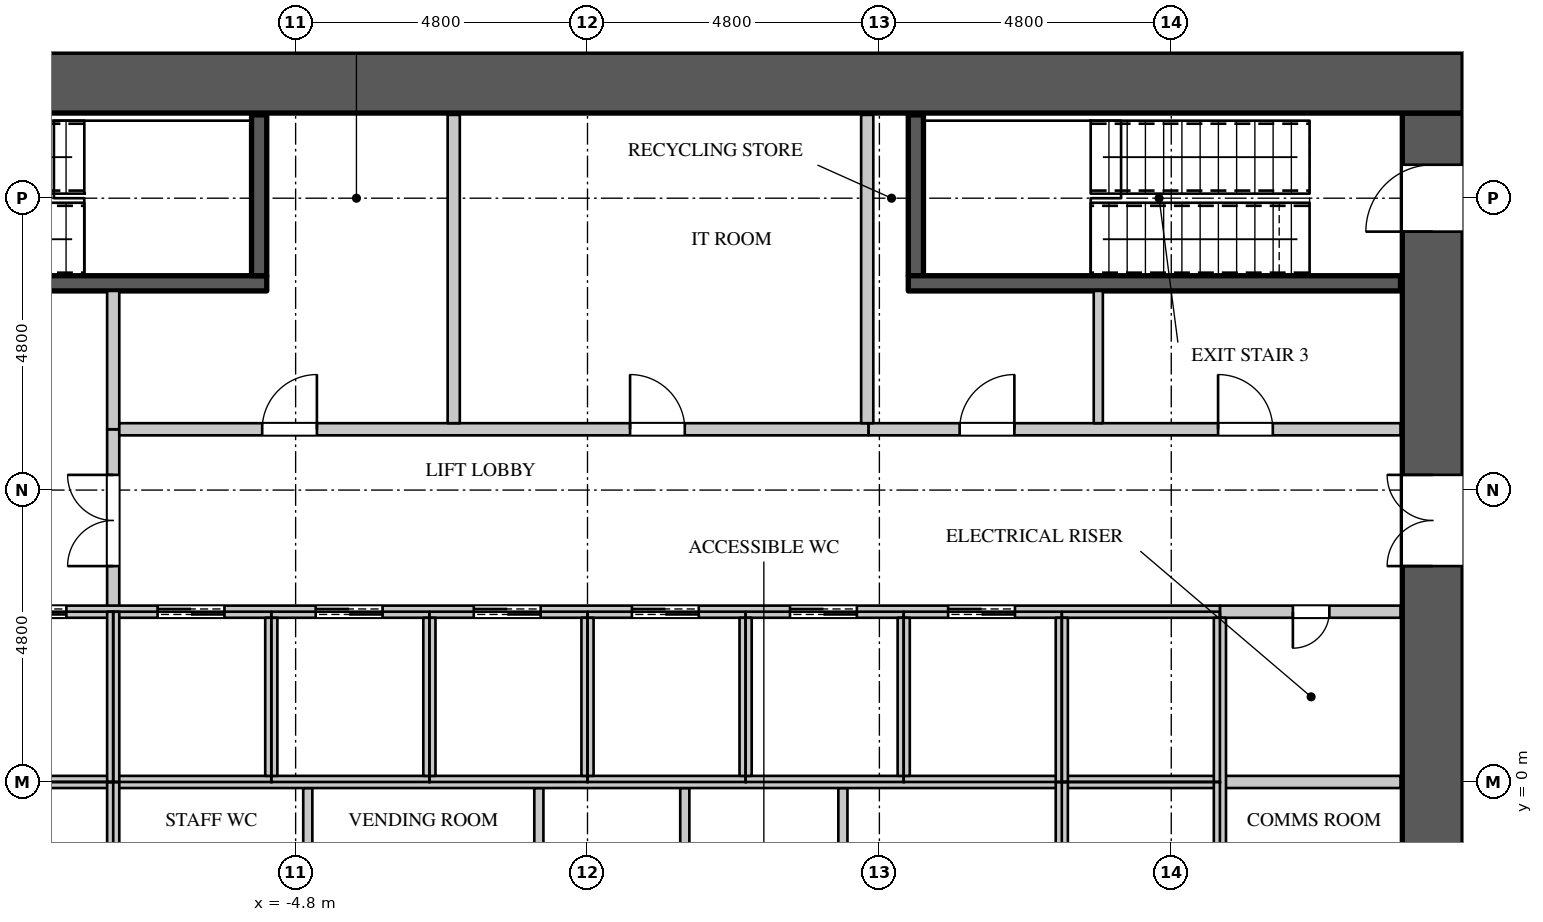
"""IFC4 building model, lengths in metres.
Left out: names, types, materials, properties, quantities, classifications, styles, units other than length and angle.
Written with IfcOpenShell. Run it as: python <this file> out.ifc"""

import sys

from ifc_helpers import new_model, si_unit, direction, frame, frame_2d, origin, place, context, subcontext, project, spatial, rectangle, extrude, element, fill, save


model = new_model("IFC4")
c1 = context("Model", 3, precision=1e-05, world=origin(), true_north=direction((0.0, 1.0)))
c2 = subcontext(c1, "Body", "Model", "MODEL_VIEW")
j1 = project(units=[si_unit("LENGTHUNIT", "METRE"), si_unit("PLANEANGLEUNIT", "RADIAN")], contexts=[c1])
p1 = place(None, origin())
s1 = spatial("IfcSite", under=j1, at=p1, CompositionType="ELEMENT")
p2 = place(p1, origin())
s2 = spatial("IfcBuilding", under=s1, at=p2, CompositionType="ELEMENT")
p3 = place(p2, frame((0.0, 0.0, 25.5)))
s3 = spatial("IfcBuildingStorey", under=s2, at=p3, CompositionType="ELEMENT", Elevation=25.5)
p4 = place(p3, frame((-14.4, 11.5, 0.0), z_axis=(0.0, 0.0, 1.0), x_axis=(1.0, 0.0, 0.0)))
e1 = element("IfcWall", 1, at=p4, inside=s3, PredefinedType="SHEAR", context=c2, shape_type="SweptSolid", body=[
    extrude(rectangle(XDim=28.8, YDim=1.0, at=frame_2d((14.4, 0.0))), origin(), (0.0, 0.0, 1.0), 4.2),
])
p5 = place(p3, frame((13.9, -11.0, 0.0), z_axis=(0.0, 0.0, 1.0), x_axis=(0.0, 1.0, 0.0)))
e2 = element("IfcWall", 2, at=p5, inside=s3, PredefinedType="SHEAR", context=c2, shape_type="SweptSolid", body=[
    extrude(rectangle(XDim=22.0, YDim=1.0, at=frame_2d((11.0, 0.0))), origin(), (0.0, 0.0, 1.0), 4.2),
])
p6 = place(p5, frame((20.05, 0.0, 0.0)))
e3 = element("IfcOpeningElement", 3, at=p6, cuts=e2, PredefinedType="OPENING", context=c2, shape_type="SweptSolid", body=[
    extrude(rectangle(XDim=1.1, YDim=2.2, at=frame_2d((0.55, 1.1))), frame((0.0, 0.51, 0.0), z_axis=(0.0, -1.0, 0.0), x_axis=(1.0, 0.0, 0.0)), (0.0, 0.0, 1.0), 1.02),
])
p7 = place(p5, frame((0.85, 0.0, 0.0)))
e4 = element("IfcOpeningElement", 4, at=p7, cuts=e2, PredefinedType="OPENING", context=c2, shape_type="SweptSolid", body=[
    extrude(rectangle(XDim=1.1, YDim=2.2, at=frame_2d((0.55, 1.1))), frame((0.0, 0.51, 0.0), z_axis=(0.0, -1.0, 0.0), x_axis=(1.0, 0.0, 0.0)), (0.0, 0.0, 1.0), 1.02),
])
p8 = place(p5, frame((14.55, 0.0, 0.0)))
e5 = element("IfcOpeningElement", 5, at=p8, cuts=e2, PredefinedType="OPENING", context=c2, shape_type="SweptSolid", body=[
    extrude(rectangle(XDim=1.5, YDim=2.4, at=frame_2d((0.75, 1.2))), frame((0.0, 0.51, 0.0), z_axis=(0.0, -1.0, 0.0), x_axis=(1.0, 0.0, 0.0)), (0.0, 0.0, 1.0), 1.02),
])
p9 = place(p5, frame((5.95, 0.0, 0.0)))
e6 = element("IfcOpeningElement", 6, at=p9, cuts=e2, PredefinedType="OPENING", context=c2, shape_type="SweptSolid", body=[
    extrude(rectangle(XDim=1.5, YDim=2.4, at=frame_2d((0.75, 1.2))), frame((0.0, 0.51, 0.0), z_axis=(0.0, -1.0, 0.0), x_axis=(1.0, 0.0, 0.0)), (0.0, 0.0, 1.0), 1.02),
])
p10 = place(p3, frame((-7.8, 2.8, 0.0), z_axis=(0.0, 0.0, 1.0), x_axis=(0.0, 1.0, 0.0)))
e7 = element("IfcWall", 7, at=p10, inside=s3, PredefinedType="PARTITIONING", context=c2, shape_type="SweptSolid", body=[
    extrude(rectangle(XDim=3.0, YDim=0.2, at=frame_2d((1.5, 0.0))), origin(), (0.0, 0.0, 1.0), 3.95),
])
p11 = place(p10, frame((0.75, 0.0, 0.0)))
e8 = element("IfcOpeningElement", 8, at=p11, cuts=e7, PredefinedType="OPENING", context=c2, shape_type="SweptSolid", body=[
    extrude(rectangle(XDim=1.5, YDim=2.4, at=frame_2d((0.75, 1.2))), frame((0.0, 0.11, 0.0), z_axis=(0.0, -1.0, 0.0), x_axis=(1.0, 0.0, 0.0)), (0.0, 0.0, 1.0), 0.22),
])
p12 = place(p3, frame((4.62, 5.8, 0.0), z_axis=(0.0, 0.0, 1.0), x_axis=(1.0, 0.0, 0.0)))
e9 = element("IfcWall", 9, at=p12, inside=s3, PredefinedType="PARTITIONING", context=c2, shape_type="SweptSolid", body=[
    extrude(rectangle(XDim=8.75, YDim=0.2, at=frame_2d((4.375, 0.0))), origin(), (0.0, 0.0, 1.0), 3.95),
])
p13 = place(p12, frame((1.5, 0.0, 0.0)))
e10 = element("IfcOpeningElement", 10, at=p13, cuts=e9, PredefinedType="OPENING", context=c2, shape_type="SweptSolid", body=[
    extrude(rectangle(XDim=0.9, YDim=2.2, at=frame_2d((0.45, 1.1))), frame((0.0, 0.11, 0.0), z_axis=(0.0, -1.0, 0.0), x_axis=(1.0, 0.0, 0.0)), (0.0, 0.0, 1.0), 0.22),
])
p14 = place(p12, frame((5.75, 0.0, 0.0)))
e11 = element("IfcOpeningElement", 11, at=p14, cuts=e9, PredefinedType="OPENING", context=c2, shape_type="SweptSolid", body=[
    extrude(rectangle(XDim=0.9, YDim=2.2, at=frame_2d((0.45, 1.1))), frame((0.0, 0.11, 0.0), z_axis=(0.0, -1.0, 0.0), x_axis=(1.0, 0.0, 0.0)), (0.0, 0.0, 1.0), 0.22),
])
for number, where, z_axis, x_axis in (
    (12, (-4.6, -2.7, 0.0), (0.0, 0.0, 1.0), (0.0, 1.0, 0.0)),
    (13, (-0.8, -2.7, 0.0), (0.0, 0.0, 1.0), (0.0, 1.0, 0.0)),
    (14, (1.6, -2.7, 0.0), (0.0, 0.0, 1.0), (0.0, 1.0, 0.0)),
    (15, (4.2, -2.7, 0.0), (0.0, 0.0, 1.0), (0.0, 1.0, 0.0)),
):
    element("IfcWall", number, at=place(p3, frame(where, z_axis=z_axis, x_axis=x_axis)), inside=s3, PredefinedType="PARTITIONING", context=c2, shape_type="SweptSolid", body=[
        extrude(rectangle(XDim=2.6, YDim=0.15, at=frame_2d((1.3, 0.0))), origin(), (0.0, 0.0, 1.0), 3.95),
    ])
p15 = place(p3, frame((8.4, 5.9, 0.0), z_axis=(0.0, 0.0, 1.0), x_axis=(0.0, 1.0, 0.0)))
e16 = element("IfcWall", 16, at=p15, inside=s3, PredefinedType="PARTITIONING", context=c2, shape_type="SweptSolid", body=[
    extrude(rectangle(XDim=2.175, YDim=0.15, at=frame_2d((1.087, 0.0))), origin(), (0.0, 0.0, 1.0), 3.95),
])
p16 = place(p3, frame((-7.8, 5.8, 0.0), z_axis=(0.0, 0.0, 1.0), x_axis=(0.0, 1.0, 0.0)))
e17 = element("IfcWall", 17, at=p16, inside=s3, PredefinedType="PARTITIONING", context=c2, shape_type="SweptSolid", body=[
    extrude(rectangle(XDim=2.275, YDim=0.2, at=frame_2d((1.137, 0.0))), origin(), (0.0, 0.0, 1.0), 3.95),
])
p17 = place(p3, frame((-7.7, 5.8, 0.0), z_axis=(0.0, 0.0, 1.0), x_axis=(1.0, 0.0, 0.0)))
e18 = element("IfcWall", 18, at=p17, inside=s3, PredefinedType="PARTITIONING", context=c2, shape_type="SweptSolid", body=[
    extrude(rectangle(XDim=12.32, YDim=0.2, at=frame_2d((6.16, 0.0))), origin(), (0.0, 0.0, 1.0), 3.95),
])
p18 = place(p17, frame((2.35, 0.0, 0.0)))
e19 = element("IfcOpeningElement", 19, at=p18, cuts=e18, PredefinedType="OPENING", context=c2, shape_type="SweptSolid", body=[
    extrude(rectangle(XDim=0.9, YDim=2.2, at=frame_2d((0.45, 1.1))), frame((0.0, 0.11, 0.0), z_axis=(0.0, -1.0, 0.0), x_axis=(1.0, 0.0, 0.0)), (0.0, 0.0, 1.0), 0.22),
])
p19 = place(p17, frame((8.4, 0.0, 0.0)))
e20 = element("IfcOpeningElement", 20, at=p19, cuts=e18, PredefinedType="OPENING", context=c2, shape_type="SweptSolid", body=[
    extrude(rectangle(XDim=0.9, YDim=2.2, at=frame_2d((0.45, 1.1))), frame((0.0, 0.11, 0.0), z_axis=(0.0, -1.0, 0.0), x_axis=(1.0, 0.0, 0.0)), (0.0, 0.0, 1.0), 0.22),
])
for number, where, z_axis, x_axis in (
    (21, (-2.2, 5.9, 0.0), (0.0, 0.0, 1.0), (0.0, 1.0, 0.0)),
    (22, (4.6, 5.9, 0.0), (0.0, 0.0, 1.0), (0.0, 1.0, 0.0)),
):
    element("IfcWall", number, at=place(p3, frame(where, z_axis=z_axis, x_axis=x_axis)), inside=s3, PredefinedType="PARTITIONING", context=c2, shape_type="SweptSolid", body=[
        extrude(rectangle(XDim=5.07, YDim=0.2, at=frame_2d((2.535, 0.0))), origin(), (0.0, 0.0, 1.0), 3.95),
    ])
p20 = place(p3, frame((10.4, 2.8, 0.0), z_axis=(0.0, 0.0, 1.0), x_axis=(1.0, 0.0, 0.0)))
e23 = element("IfcWall", 23, at=p20, inside=s3, PredefinedType="PARTITIONING", context=c2, shape_type="SweptSolid", body=[
    extrude(rectangle(XDim=2.97, YDim=0.2, at=frame_2d((1.485, 0.0))), origin(), (0.0, 0.0, 1.0), 3.95),
])
p21 = place(p20, frame((1.2, 0.0, 0.0)))
e24 = element("IfcOpeningElement", 24, at=p21, cuts=e23, PredefinedType="OPENING", context=c2, shape_type="SweptSolid", body=[
    extrude(rectangle(XDim=0.6, YDim=2.0, at=frame_2d((0.3, 1.0))), frame((0.0, 0.11, 0.0), z_axis=(0.0, -1.0, 0.0), x_axis=(1.0, 0.0, 0.0)), (0.0, 0.0, 1.0), 0.22),
])
p22 = place(p3, frame((10.4, 0.0, 0.0), z_axis=(0.0, 0.0, 1.0), x_axis=(1.0, 0.0, 0.0)))
e25 = element("IfcWall", 25, at=p22, inside=s3, PredefinedType="PARTITIONING", context=c2, shape_type="SweptSolid", body=[
    extrude(rectangle(XDim=2.97, YDim=0.2, at=frame_2d((1.485, 0.0))), origin(), (0.0, 0.0, 1.0), 3.95),
])
p23 = place(p3, frame((-13.37, 0.0, 0.0), z_axis=(0.0, 0.0, 1.0), x_axis=(1.0, 0.0, 0.0)))
e26 = element("IfcWall", 26, at=p23, inside=s3, PredefinedType="PARTITIONING", context=c2, shape_type="SweptSolid", body=[
    extrude(rectangle(XDim=23.77, YDim=0.2, at=frame_2d((11.885, 0.0))), origin(), (0.0, 0.0, 1.0), 3.95),
])
p24 = place(p3, frame((-13.37, 2.8, 0.0), z_axis=(0.0, 0.0, 1.0), x_axis=(1.0, 0.0, 0.0)))
e27 = element("IfcWall", 27, at=p24, inside=s3, PredefinedType="PARTITIONING", context=c2, shape_type="SweptSolid", body=[
    extrude(rectangle(XDim=23.77, YDim=0.2, at=frame_2d((11.885, 0.0))), origin(), (0.0, 0.0, 1.0), 3.95),
])
p25 = place(p24, frame((0.9, 0.0, 0.0)))
e28 = element("IfcOpeningElement", 28, at=p25, cuts=e27, PredefinedType="OPENING", context=c2, shape_type="SweptSolid", body=[
    extrude(rectangle(XDim=1.1, YDim=2.2, at=frame_2d((0.55, 1.1))), frame((0.0, 0.11, 0.0), z_axis=(0.0, -1.0, 0.0), x_axis=(1.0, 0.0, 0.0)), (0.0, 0.0, 1.0), 0.22),
])
p26 = place(p24, frame((3.7, 0.0, 0.0)))
e29 = element("IfcOpeningElement", 29, at=p26, cuts=e27, PredefinedType="OPENING", context=c2, shape_type="SweptSolid", body=[
    extrude(rectangle(XDim=1.1, YDim=2.2, at=frame_2d((0.55, 1.1))), frame((0.0, 0.11, 0.0), z_axis=(0.0, -1.0, 0.0), x_axis=(1.0, 0.0, 0.0)), (0.0, 0.0, 1.0), 0.22),
])
p27 = place(p24, frame((6.3, 0.0, 0.0)))
e30 = element("IfcOpeningElement", 30, at=p27, cuts=e27, PredefinedType="OPENING", context=c2, shape_type="SweptSolid", body=[
    extrude(rectangle(XDim=1.1, YDim=2.2, at=frame_2d((0.55, 1.1))), frame((0.0, 0.11, 0.0), z_axis=(0.0, -1.0, 0.0), x_axis=(1.0, 0.0, 0.0)), (0.0, 0.0, 1.0), 0.22),
])
p28 = place(p24, frame((8.9, 0.0, 0.0)))
e31 = element("IfcOpeningElement", 31, at=p28, cuts=e27, PredefinedType="OPENING", context=c2, shape_type="SweptSolid", body=[
    extrude(rectangle(XDim=1.1, YDim=2.2, at=frame_2d((0.55, 1.1))), frame((0.0, 0.11, 0.0), z_axis=(0.0, -1.0, 0.0), x_axis=(1.0, 0.0, 0.0)), (0.0, 0.0, 1.0), 0.22),
])
p29 = place(p24, frame((11.5, 0.0, 0.0)))
e32 = element("IfcOpeningElement", 32, at=p29, cuts=e27, PredefinedType="OPENING", context=c2, shape_type="SweptSolid", body=[
    extrude(rectangle(XDim=1.1, YDim=2.2, at=frame_2d((0.55, 1.1))), frame((0.0, 0.11, 0.0), z_axis=(0.0, -1.0, 0.0), x_axis=(1.0, 0.0, 0.0)), (0.0, 0.0, 1.0), 0.22),
])
p30 = place(p24, frame((14.1, 0.0, 0.0)))
e33 = element("IfcOpeningElement", 33, at=p30, cuts=e27, PredefinedType="OPENING", context=c2, shape_type="SweptSolid", body=[
    extrude(rectangle(XDim=1.1, YDim=2.2, at=frame_2d((0.55, 1.1))), frame((0.0, 0.11, 0.0), z_axis=(0.0, -1.0, 0.0), x_axis=(1.0, 0.0, 0.0)), (0.0, 0.0, 1.0), 0.22),
])
p31 = place(p24, frame((16.7, 0.0, 0.0)))
e34 = element("IfcOpeningElement", 34, at=p31, cuts=e27, PredefinedType="OPENING", context=c2, shape_type="SweptSolid", body=[
    extrude(rectangle(XDim=1.1, YDim=2.2, at=frame_2d((0.55, 1.1))), frame((0.0, 0.11, 0.0), z_axis=(0.0, -1.0, 0.0), x_axis=(1.0, 0.0, 0.0)), (0.0, 0.0, 1.0), 0.22),
])
p32 = place(p24, frame((19.3, 0.0, 0.0)))
e35 = element("IfcOpeningElement", 35, at=p32, cuts=e27, PredefinedType="OPENING", context=c2, shape_type="SweptSolid", body=[
    extrude(rectangle(XDim=1.1, YDim=2.2, at=frame_2d((0.55, 1.1))), frame((0.0, 0.11, 0.0), z_axis=(0.0, -1.0, 0.0), x_axis=(1.0, 0.0, 0.0)), (0.0, 0.0, 1.0), 0.22),
])
for number, where, z_axis, x_axis in (
    (36, (-7.8, -2.8, 0.0), (0.0, 0.0, 1.0), (0.0, 1.0, 0.0)),
    (37, (-7.8, 0.0, 0.0), (0.0, 0.0, 1.0), (0.0, 1.0, 0.0)),
):
    element("IfcWall", number, at=place(p3, frame(where, z_axis=z_axis, x_axis=x_axis)), inside=s3, PredefinedType="PARTITIONING", context=c2, shape_type="SweptSolid", body=[
        extrude(rectangle(XDim=2.8, YDim=0.2, at=frame_2d((1.4, 0.0))), origin(), (0.0, 0.0, 1.0), 3.95),
    ])
for number, where, z_axis, x_axis in (
    (38, (-5.2, 0.1, 0.0), (0.0, 0.0, 1.0), (0.0, 1.0, 0.0)),
    (39, (-2.6, 0.1, 0.0), (0.0, 0.0, 1.0), (0.0, 1.0, 0.0)),
    (40, (0.0, 0.1, 0.0), (0.0, 0.0, 1.0), (0.0, 1.0, 0.0)),
    (41, (2.6, 0.1, 0.0), (0.0, 0.0, 1.0), (0.0, 1.0, 0.0)),
    (42, (5.2, 0.1, 0.0), (0.0, 0.0, 1.0), (0.0, 1.0, 0.0)),
):
    element("IfcWall", number, at=place(p3, frame(where, z_axis=z_axis, x_axis=x_axis)), inside=s3, PredefinedType="PARTITIONING", context=c2, shape_type="SweptSolid", body=[
        extrude(rectangle(XDim=2.6, YDim=0.2, at=frame_2d((1.3, 0.0))), origin(), (0.0, 0.0, 1.0), 3.95),
    ])
for number, where, z_axis, x_axis in (
    (43, (7.8, -2.7, 0.0), (0.0, 0.0, 1.0), (0.0, 1.0, 0.0)),
    (44, (7.8, 0.0, 0.0), (0.0, 0.0, 1.0), (0.0, 1.0, 0.0)),
):
    element("IfcWall", number, at=place(p3, frame(where, z_axis=z_axis, x_axis=x_axis)), inside=s3, PredefinedType="PARTITIONING", context=c2, shape_type="SweptSolid", body=[
        extrude(rectangle(XDim=2.7, YDim=0.2, at=frame_2d((1.35, 0.0))), origin(), (0.0, 0.0, 1.0), 3.95),
    ])
p33 = place(p3, frame((10.4, -2.7, 0.0), z_axis=(0.0, 0.0, 1.0), x_axis=(0.0, 1.0, 0.0)))
e45 = element("IfcWall", 45, at=p33, inside=s3, PredefinedType="PARTITIONING", context=c2, shape_type="SweptSolid", body=[
    extrude(rectangle(XDim=5.4, YDim=0.2, at=frame_2d((2.7, 0.0))), origin(), (0.0, 0.0, 1.0), 3.95),
])
p34 = place(p3, frame((-13.37, 8.2, 0.0), z_axis=(0.0, 0.0, 1.0), x_axis=(1.0, 0.0, 0.0)))
e46 = element("IfcWall", 46, at=p34, inside=s3, PredefinedType="SHEAR", context=c2, shape_type="SweptSolid", body=[
    extrude(rectangle(XDim=8.095, YDim=0.25, at=frame_2d((4.048, 0.0))), origin(), (0.0, 0.0, 1.0), 3.95),
])
p35 = place(p34, frame((0.15, 0.0, 0.0)))
e47 = element("IfcOpeningElement", 47, at=p35, cuts=e46, PredefinedType="OPENING", context=c2, shape_type="SweptSolid", body=[
    extrude(rectangle(XDim=1.1, YDim=2.2, at=frame_2d((0.55, 1.1))), frame((0.0, 0.135, 0.0), z_axis=(0.0, -1.0, 0.0), x_axis=(1.0, 0.0, 0.0)), (0.0, 0.0, 1.0), 0.27),
])
for number, where, z_axis, x_axis in (
    (48, (-5.4, 8.325, 0.0), (0.0, 0.0, 1.0), (0.0, 1.0, 0.0)),
    (49, (5.4, 8.325, 0.0), (0.0, 0.0, 1.0), (0.0, 1.0, 0.0)),
):
    element("IfcWall", number, at=place(p3, frame(where, z_axis=z_axis, x_axis=x_axis)), inside=s3, PredefinedType="SHEAR", context=c2, shape_type="SweptSolid", body=[
        extrude(rectangle(XDim=2.645, YDim=0.25, at=frame_2d((1.323, 0.0))), origin(), (0.0, 0.0, 1.0), 3.95),
    ])
p36 = place(p3, frame((5.275, 8.2, 0.0), z_axis=(0.0, 0.0, 1.0), x_axis=(1.0, 0.0, 0.0)))
e50 = element("IfcWall", 50, at=p36, inside=s3, PredefinedType="SHEAR", context=c2, shape_type="SweptSolid", body=[
    extrude(rectangle(XDim=8.095, YDim=0.25, at=frame_2d((4.048, 0.0))), origin(), (0.0, 0.0, 1.0), 3.95),
])
p37 = place(p21, origin())
e51 = element("IfcDoor", 51, at=p37, inside=s3, OperationType="SINGLE_SWING_RIGHT", PredefinedType="DOOR", context=c2, shape_type="SweptSolid", body=[
    extrude(rectangle(XDim=0.6, YDim=2.0, at=frame_2d((0.3, 1.0))), frame((0.0, 0.025, 0.0), z_axis=(0.0, -1.0, 0.0), x_axis=(1.0, 0.0, 0.0)), (0.0, 0.0, 1.0), 0.05),
])
fill(e24, e51)
p38 = place(p18, origin())
e52 = element("IfcDoor", 52, at=p38, inside=s3, OperationType="SINGLE_SWING_RIGHT", PredefinedType="DOOR", context=c2, shape_type="SweptSolid", body=[
    extrude(rectangle(XDim=0.9, YDim=2.2, at=frame_2d((0.45, 1.1))), frame((0.0, 0.025, 0.0), z_axis=(0.0, -1.0, 0.0), x_axis=(1.0, 0.0, 0.0)), (0.0, 0.0, 1.0), 0.05),
])
fill(e19, e52)
p39 = place(p19, origin())
e53 = element("IfcDoor", 53, at=p39, inside=s3, OperationType="SINGLE_SWING_LEFT", PredefinedType="DOOR", context=c2, shape_type="SweptSolid", body=[
    extrude(rectangle(XDim=0.9, YDim=2.2, at=frame_2d((0.45, 1.1))), frame((0.0, 0.025, 0.0), z_axis=(0.0, -1.0, 0.0), x_axis=(1.0, 0.0, 0.0)), (0.0, 0.0, 1.0), 0.05),
])
fill(e20, e53)
p40 = place(p13, origin())
e54 = element("IfcDoor", 54, at=p40, inside=s3, OperationType="SINGLE_SWING_RIGHT", PredefinedType="DOOR", context=c2, shape_type="SweptSolid", body=[
    extrude(rectangle(XDim=0.9, YDim=2.2, at=frame_2d((0.45, 1.1))), frame((0.0, 0.025, 0.0), z_axis=(0.0, -1.0, 0.0), x_axis=(1.0, 0.0, 0.0)), (0.0, 0.0, 1.0), 0.05),
])
fill(e10, e54)
p41 = place(p14, origin())
e55 = element("IfcDoor", 55, at=p41, inside=s3, OperationType="SINGLE_SWING_LEFT", PredefinedType="DOOR", context=c2, shape_type="SweptSolid", body=[
    extrude(rectangle(XDim=0.9, YDim=2.2, at=frame_2d((0.45, 1.1))), frame((0.0, 0.025, 0.0), z_axis=(0.0, -1.0, 0.0), x_axis=(1.0, 0.0, 0.0)), (0.0, 0.0, 1.0), 0.05),
])
fill(e11, e55)
p42 = place(p26, origin())
e56 = element("IfcDoor", 56, at=p42, inside=s3, OperationType="DOUBLE_DOOR_SLIDING", PredefinedType="DOOR", context=c2, shape_type="SweptSolid", body=[
    extrude(rectangle(XDim=1.1, YDim=2.2, at=frame_2d((0.55, 1.1))), frame((0.0, 0.025, 0.0), z_axis=(0.0, -1.0, 0.0), x_axis=(1.0, 0.0, 0.0)), (0.0, 0.0, 1.0), 0.05),
])
fill(e29, e56)
p43 = place(p27, origin())
e57 = element("IfcDoor", 57, at=p43, inside=s3, OperationType="DOUBLE_DOOR_SLIDING", PredefinedType="DOOR", context=c2, shape_type="SweptSolid", body=[
    extrude(rectangle(XDim=1.1, YDim=2.2, at=frame_2d((0.55, 1.1))), frame((0.0, 0.025, 0.0), z_axis=(0.0, -1.0, 0.0), x_axis=(1.0, 0.0, 0.0)), (0.0, 0.0, 1.0), 0.05),
])
fill(e30, e57)
p44 = place(p28, origin())
e58 = element("IfcDoor", 58, at=p44, inside=s3, OperationType="DOUBLE_DOOR_SLIDING", PredefinedType="DOOR", context=c2, shape_type="SweptSolid", body=[
    extrude(rectangle(XDim=1.1, YDim=2.2, at=frame_2d((0.55, 1.1))), frame((0.0, 0.025, 0.0), z_axis=(0.0, -1.0, 0.0), x_axis=(1.0, 0.0, 0.0)), (0.0, 0.0, 1.0), 0.05),
])
fill(e31, e58)
p45 = place(p29, origin())
e59 = element("IfcDoor", 59, at=p45, inside=s3, OperationType="DOUBLE_DOOR_SLIDING", PredefinedType="DOOR", context=c2, shape_type="SweptSolid", body=[
    extrude(rectangle(XDim=1.1, YDim=2.2, at=frame_2d((0.55, 1.1))), frame((0.0, 0.025, 0.0), z_axis=(0.0, -1.0, 0.0), x_axis=(1.0, 0.0, 0.0)), (0.0, 0.0, 1.0), 0.05),
])
fill(e32, e59)
p46 = place(p30, origin())
e60 = element("IfcDoor", 60, at=p46, inside=s3, OperationType="DOUBLE_DOOR_SLIDING", PredefinedType="DOOR", context=c2, shape_type="SweptSolid", body=[
    extrude(rectangle(XDim=1.1, YDim=2.2, at=frame_2d((0.55, 1.1))), frame((0.0, 0.025, 0.0), z_axis=(0.0, -1.0, 0.0), x_axis=(1.0, 0.0, 0.0)), (0.0, 0.0, 1.0), 0.05),
])
fill(e33, e60)
p47 = place(p31, origin())
e61 = element("IfcDoor", 61, at=p47, inside=s3, OperationType="DOUBLE_DOOR_SLIDING", PredefinedType="DOOR", context=c2, shape_type="SweptSolid", body=[
    extrude(rectangle(XDim=1.1, YDim=2.2, at=frame_2d((0.55, 1.1))), frame((0.0, 0.025, 0.0), z_axis=(0.0, -1.0, 0.0), x_axis=(1.0, 0.0, 0.0)), (0.0, 0.0, 1.0), 0.05),
])
fill(e34, e61)
p48 = place(p32, origin())
e62 = element("IfcDoor", 62, at=p48, inside=s3, OperationType="DOUBLE_DOOR_SLIDING", PredefinedType="DOOR", context=c2, shape_type="SweptSolid", body=[
    extrude(rectangle(XDim=1.1, YDim=2.2, at=frame_2d((0.55, 1.1))), frame((0.0, 0.025, 0.0), z_axis=(0.0, -1.0, 0.0), x_axis=(1.0, 0.0, 0.0)), (0.0, 0.0, 1.0), 0.05),
])
fill(e35, e62)
p49 = place(p11, origin())
e63 = element("IfcDoor", 63, at=p49, inside=s3, OperationType="DOUBLE_DOOR_SINGLE_SWING", PredefinedType="DOOR", context=c2, shape_type="SweptSolid", body=[
    extrude(rectangle(XDim=1.5, YDim=2.4, at=frame_2d((0.75, 1.2))), frame((0.0, 0.025, 0.0), z_axis=(0.0, -1.0, 0.0), x_axis=(1.0, 0.0, 0.0)), (0.0, 0.0, 1.0), 0.05),
])
fill(e8, e63)
p50 = place(p6, origin())
e64 = element("IfcDoor", 64, at=p50, inside=s3, OperationType="SINGLE_SWING_LEFT", PredefinedType="DOOR", context=c2, shape_type="SweptSolid", body=[
    extrude(rectangle(XDim=1.1, YDim=2.2, at=frame_2d((0.55, 1.1))), frame((0.0, 0.495, 0.0), z_axis=(0.0, -1.0, 0.0), x_axis=(1.0, 0.0, 0.0)), (0.0, 0.0, 1.0), 0.05),
])
fill(e3, e64)
p51 = place(p8, origin())
e65 = element("IfcDoor", 65, at=p51, inside=s3, OperationType="DOUBLE_DOOR_SINGLE_SWING", PredefinedType="DOOR", context=c2, shape_type="SweptSolid", body=[
    extrude(rectangle(XDim=1.5, YDim=2.4, at=frame_2d((0.75, 1.2))), frame((0.0, 0.495, 0.0), z_axis=(0.0, -1.0, 0.0), x_axis=(1.0, 0.0, 0.0)), (0.0, 0.0, 1.0), 0.05),
])
fill(e5, e65)
save(model, sys.argv[1])
